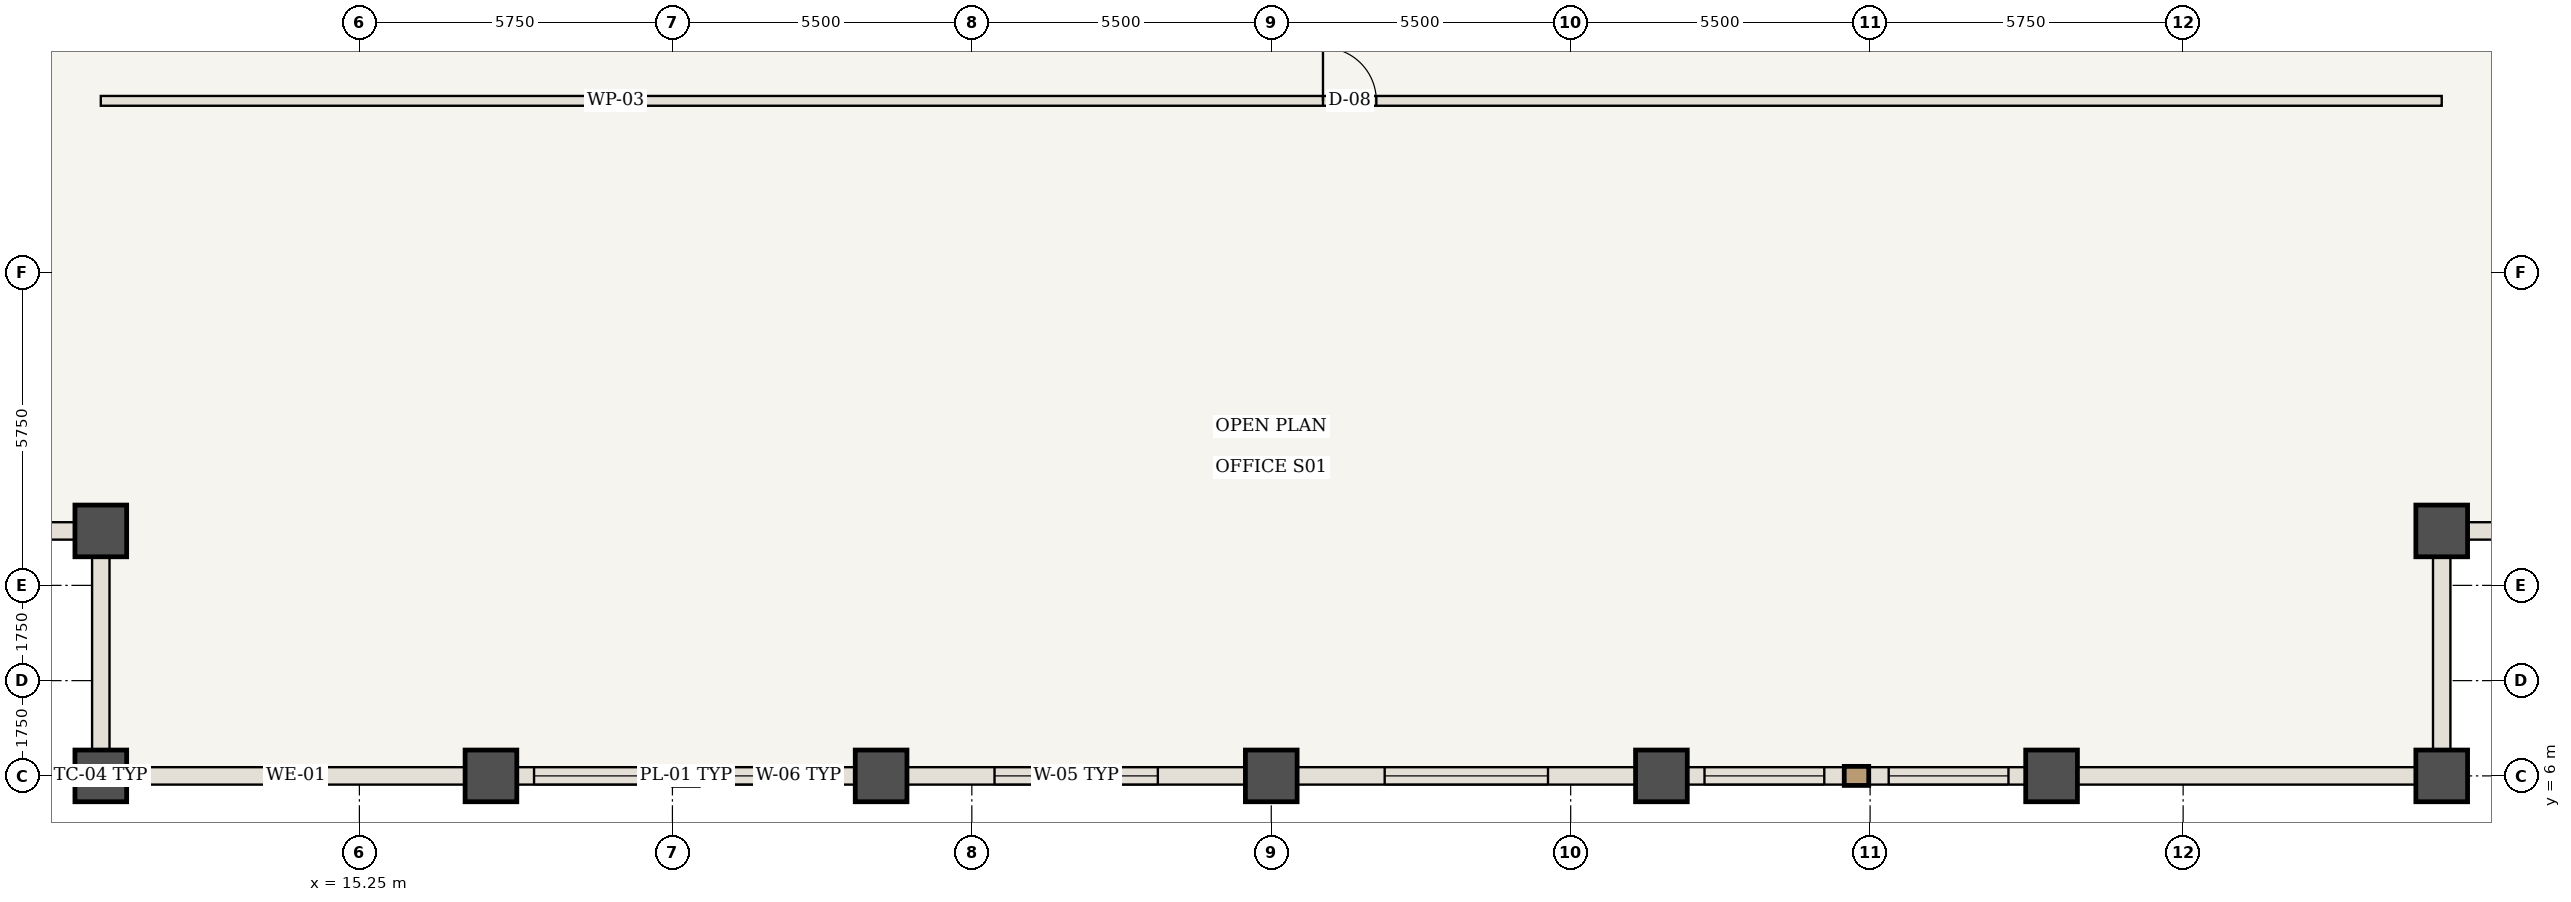
"""IFC4 building model, lengths in metres.
Left out: names, types, materials, properties, quantities, classifications, styles, units other than length and angle.
Written with IfcOpenShell. Run it as: python <this file> out.ifc"""

import sys

from ifc_helpers import new_model, si_unit, direction, frame, frame_2d, origin, origin_2d, place, context, subcontext, project, spatial, rectangle, extrude, element, fill, save


model = new_model("IFC4")
c1 = context("Model", 3, precision=1e-05, world=origin(), true_north=direction((0.0, 1.0)))
c2 = subcontext(c1, "Body", "Model", "MODEL_VIEW")
j1 = project(units=[si_unit("LENGTHUNIT", "METRE"), si_unit("PLANEANGLEUNIT", "RADIAN")], contexts=[c1])
p1 = place(None, origin())
s1 = spatial("IfcSite", under=j1, at=p1, CompositionType="ELEMENT")
p2 = place(p1, origin())
s2 = spatial("IfcBuilding", under=s1, at=p2, CompositionType="ELEMENT")
p3 = place(p2, frame((0.0, 0.0, 110.6)))
s3 = spatial("IfcBuildingStorey", under=s2, at=p3, CompositionType="ELEMENT", Elevation=110.6)
for number, where, z_axis, x_axis in (
    (1, (10.5, 6.0, 0.0), (0.0, 0.0, 1.0), (1.0, 0.0, 0.0)),
    (2, (10.5, 10.5, 0.0), (0.0, 0.0, 1.0), (1.0, 0.0, 0.0)),
    (3, (53.5, 6.0, 0.0), (0.0, 0.0, 1.0), (1.0, 0.0, 0.0)),
    (4, (53.5, 10.5, 0.0), (0.0, 0.0, 1.0), (1.0, 0.0, 0.0)),
    (5, (17.667, 6.0, 0.0), (0.0, 0.0, 1.0), (1.0, 0.0, 0.0)),
    (6, (24.833, 6.0, 0.0), (0.0, 0.0, 1.0), (1.0, 0.0, 0.0)),
    (7, (32.0, 6.0, 0.0), (0.0, 0.0, 1.0), (1.0, 0.0, 0.0)),
    (8, (39.167, 6.0, 0.0), (0.0, 0.0, 1.0), (1.0, 0.0, 0.0)),
    (9, (46.333, 6.0, 0.0), (0.0, 0.0, 1.0), (1.0, 0.0, 0.0)),
):
    element("IfcColumn", number, at=place(p3, frame(where, z_axis=z_axis, x_axis=x_axis)), inside=s3, PredefinedType="COLUMN", context=c2, shape_type="SweptSolid", body=[
        extrude(rectangle(XDim=0.95, YDim=0.95, at=origin_2d()), origin(), (0.0, 0.0, 1.0), 3.85),
    ])
p4 = place(p3, frame((10.5, 18.4, 0.0), z_axis=(0.0, 0.0, 1.0), x_axis=(1.0, 0.0, 0.0)))
e10 = element("IfcWall", 10, at=p4, inside=s3, PredefinedType="STANDARD", context=c2, shape_type="SweptSolid", body=[
    extrude(rectangle(XDim=43.0, YDim=0.18, at=frame_2d((21.5, 0.0))), origin(), (0.0, 0.0, 1.0), 3.43),
])
p5 = place(p4, frame((22.45, 0.0, 0.0)))
e11 = element("IfcOpeningElement", 11, at=p5, cuts=e10, PredefinedType="OPENING", context=c2, shape_type="SweptSolid", body=[
    extrude(rectangle(XDim=0.98, YDim=2.2, at=frame_2d((0.49, 1.1))), frame((0.0, 0.1, 0.0), z_axis=(0.0, -1.0, 0.0), x_axis=(1.0, 0.0, 0.0)), (0.0, 0.0, 1.0), 0.2),
])
p6 = place(p3, frame((17.667, 6.0, 0.0), z_axis=(0.0, 0.0, 1.0), x_axis=(-1.0, 0.0, 0.0)))
e12 = element("IfcWall", 12, at=p6, inside=s3, PredefinedType="USERDEFINED", context=c2, shape_type="SweptSolid", body=[
    extrude(rectangle(XDim=7.167, YDim=0.32, at=frame_2d((3.583, 0.0))), origin(), (0.0, 0.0, 1.0), 2.63),
])
p7 = place(p3, frame((24.833, 6.0, 0.0), z_axis=(0.0, 0.0, 1.0), x_axis=(-1.0, 0.0, 0.0)))
e13 = element("IfcWall", 13, at=p7, inside=s3, PredefinedType="USERDEFINED", context=c2, shape_type="SweptSolid", body=[
    extrude(rectangle(XDim=7.167, YDim=0.32, at=frame_2d((3.583, 0.0))), origin(), (0.0, 0.0, 1.0), 2.63),
])
p8 = place(p7, frame((0.792, 0.0, 0.85)))
e14 = element("IfcOpeningElement", 14, at=p8, cuts=e13, PredefinedType="OPENING", context=c2, shape_type="SweptSolid", body=[
    extrude(rectangle(XDim=2.2, YDim=1.58, at=frame_2d((1.1, 0.79))), frame((0.0, 0.17, 0.0), z_axis=(0.0, -1.0, 0.0), x_axis=(1.0, 0.0, 0.0)), (0.0, 0.0, 1.0), 0.34),
])
p9 = place(p7, frame((4.175, 0.0, 0.85)))
e15 = element("IfcOpeningElement", 15, at=p9, cuts=e13, PredefinedType="OPENING", context=c2, shape_type="SweptSolid", body=[
    extrude(rectangle(XDim=2.2, YDim=1.58, at=frame_2d((1.1, 0.79))), frame((0.0, 0.17, 0.0), z_axis=(0.0, -1.0, 0.0), x_axis=(1.0, 0.0, 0.0)), (0.0, 0.0, 1.0), 0.34),
])
p10 = place(p3, frame((32.0, 6.0, 0.0), z_axis=(0.0, 0.0, 1.0), x_axis=(-1.0, 0.0, 0.0)))
e16 = element("IfcWall", 16, at=p10, inside=s3, PredefinedType="USERDEFINED", context=c2, shape_type="SweptSolid", body=[
    extrude(rectangle(XDim=7.167, YDim=0.32, at=frame_2d((3.583, 0.0))), origin(), (0.0, 0.0, 1.0), 2.63),
])
p11 = place(p10, frame((2.083, 0.0, 0.85)))
e17 = element("IfcOpeningElement", 17, at=p11, cuts=e16, PredefinedType="OPENING", context=c2, shape_type="SweptSolid", body=[
    extrude(rectangle(XDim=3.0, YDim=1.58, at=frame_2d((1.5, 0.79))), frame((0.0, 0.17, 0.0), z_axis=(0.0, -1.0, 0.0), x_axis=(1.0, 0.0, 0.0)), (0.0, 0.0, 1.0), 0.34),
])
p12 = place(p3, frame((39.167, 6.0, 0.0), z_axis=(0.0, 0.0, 1.0), x_axis=(-1.0, 0.0, 0.0)))
e18 = element("IfcWall", 18, at=p12, inside=s3, PredefinedType="USERDEFINED", context=c2, shape_type="SweptSolid", body=[
    extrude(rectangle(XDim=7.167, YDim=0.32, at=frame_2d((3.583, 0.0))), origin(), (0.0, 0.0, 1.0), 2.63),
])
p13 = place(p12, frame((2.083, 0.0, 0.85)))
e19 = element("IfcOpeningElement", 19, at=p13, cuts=e18, PredefinedType="OPENING", context=c2, shape_type="SweptSolid", body=[
    extrude(rectangle(XDim=3.0, YDim=1.58, at=frame_2d((1.5, 0.79))), frame((0.0, 0.17, 0.0), z_axis=(0.0, -1.0, 0.0), x_axis=(1.0, 0.0, 0.0)), (0.0, 0.0, 1.0), 0.34),
])
p14 = place(p3, frame((46.333, 6.0, 0.0), z_axis=(0.0, 0.0, 1.0), x_axis=(-1.0, 0.0, 0.0)))
e20 = element("IfcWall", 20, at=p14, inside=s3, PredefinedType="USERDEFINED", context=c2, shape_type="SweptSolid", body=[
    extrude(rectangle(XDim=7.167, YDim=0.32, at=frame_2d((3.583, 0.0))), origin(), (0.0, 0.0, 1.0), 2.63),
])
p15 = place(p14, frame((0.792, 0.0, 0.85)))
e21 = element("IfcOpeningElement", 21, at=p15, cuts=e20, PredefinedType="OPENING", context=c2, shape_type="SweptSolid", body=[
    extrude(rectangle(XDim=2.2, YDim=1.58, at=frame_2d((1.1, 0.79))), frame((0.0, 0.17, 0.0), z_axis=(0.0, -1.0, 0.0), x_axis=(1.0, 0.0, 0.0)), (0.0, 0.0, 1.0), 0.34),
])
p16 = place(p14, frame((4.175, 0.0, 0.85)))
e22 = element("IfcOpeningElement", 22, at=p16, cuts=e20, PredefinedType="OPENING", context=c2, shape_type="SweptSolid", body=[
    extrude(rectangle(XDim=2.2, YDim=1.58, at=frame_2d((1.1, 0.79))), frame((0.0, 0.17, 0.0), z_axis=(0.0, -1.0, 0.0), x_axis=(1.0, 0.0, 0.0)), (0.0, 0.0, 1.0), 0.34),
])
p17 = place(p3, frame((53.5, 6.0, 0.0), z_axis=(0.0, 0.0, 1.0), x_axis=(-1.0, 0.0, 0.0)))
e23 = element("IfcWall", 23, at=p17, inside=s3, PredefinedType="USERDEFINED", context=c2, shape_type="SweptSolid", body=[
    extrude(rectangle(XDim=7.167, YDim=0.32, at=frame_2d((3.583, 0.0))), origin(), (0.0, 0.0, 1.0), 2.63),
])
for number, where, z_axis, x_axis in (
    (24, (10.5, 6.0, 0.0), (0.0, 0.0, 1.0), (0.0, 1.0, 0.0)),
    (25, (10.5, 10.5, 0.0), (0.0, 0.0, 1.0), (-1.0, 0.0, 0.0)),
    (26, (53.5, 10.5, 0.0), (0.0, 0.0, 1.0), (0.0, -1.0, 0.0)),
    (27, (58.0, 10.5, 0.0), (0.0, 0.0, 1.0), (-1.0, 0.0, 0.0)),
):
    element("IfcWall", number, at=place(p3, frame(where, z_axis=z_axis, x_axis=x_axis)), inside=s3, PredefinedType="USERDEFINED", context=c2, shape_type="SweptSolid", body=[
        extrude(rectangle(XDim=4.5, YDim=0.32, at=frame_2d((2.25, 0.0))), origin(), (0.0, 0.0, 1.0), 2.63),
    ])
p18 = place(p5, origin())
e28 = element("IfcDoor", 28, at=p18, inside=s3, OperationType="SINGLE_SWING_LEFT", PredefinedType="DOOR", context=c2, shape_type="SweptSolid", body=[
    extrude(rectangle(XDim=0.98, YDim=2.2, at=frame_2d((0.49, 1.1))), frame((0.0, 0.025, 0.0), z_axis=(0.0, -1.0, 0.0), x_axis=(1.0, 0.0, 0.0)), (0.0, 0.0, 1.0), 0.05),
])
fill(e11, e28)
p19 = place(p8, origin())
e29 = element("IfcWindow", 29, at=p19, inside=s3, PartitioningType="SINGLE_PANEL", PredefinedType="WINDOW", context=c2, shape_type="SweptSolid", body=[
    extrude(rectangle(XDim=2.2, YDim=1.58, at=frame_2d((1.1, 0.79))), frame((0.0, 0.03, 0.0), z_axis=(0.0, -1.0, 0.0), x_axis=(1.0, 0.0, 0.0)), (0.0, 0.0, 1.0), 0.06),
])
fill(e14, e29)
p20 = place(p9, origin())
e30 = element("IfcWindow", 30, at=p20, inside=s3, PartitioningType="SINGLE_PANEL", PredefinedType="WINDOW", context=c2, shape_type="SweptSolid", body=[
    extrude(rectangle(XDim=2.2, YDim=1.58, at=frame_2d((1.1, 0.79))), frame((0.0, 0.03, 0.0), z_axis=(0.0, -1.0, 0.0), x_axis=(1.0, 0.0, 0.0)), (0.0, 0.0, 1.0), 0.06),
])
fill(e15, e30)
p21 = place(p11, origin())
e31 = element("IfcWindow", 31, at=p21, inside=s3, PartitioningType="SINGLE_PANEL", PredefinedType="WINDOW", context=c2, shape_type="SweptSolid", body=[
    extrude(rectangle(XDim=3.0, YDim=1.58, at=frame_2d((1.5, 0.79))), frame((0.0, 0.03, 0.0), z_axis=(0.0, -1.0, 0.0), x_axis=(1.0, 0.0, 0.0)), (0.0, 0.0, 1.0), 0.06),
])
fill(e17, e31)
p22 = place(p13, origin())
e32 = element("IfcWindow", 32, at=p22, inside=s3, PartitioningType="SINGLE_PANEL", PredefinedType="WINDOW", context=c2, shape_type="SweptSolid", body=[
    extrude(rectangle(XDim=3.0, YDim=1.58, at=frame_2d((1.5, 0.79))), frame((0.0, 0.03, 0.0), z_axis=(0.0, -1.0, 0.0), x_axis=(1.0, 0.0, 0.0)), (0.0, 0.0, 1.0), 0.06),
])
fill(e19, e32)
p23 = place(p15, origin())
e33 = element("IfcWindow", 33, at=p23, inside=s3, PartitioningType="SINGLE_PANEL", PredefinedType="WINDOW", context=c2, shape_type="SweptSolid", body=[
    extrude(rectangle(XDim=2.2, YDim=1.58, at=frame_2d((1.1, 0.79))), frame((0.0, 0.03, 0.0), z_axis=(0.0, -1.0, 0.0), x_axis=(1.0, 0.0, 0.0)), (0.0, 0.0, 1.0), 0.06),
])
fill(e21, e33)
p24 = place(p16, origin())
e34 = element("IfcWindow", 34, at=p24, inside=s3, PartitioningType="SINGLE_PANEL", PredefinedType="WINDOW", context=c2, shape_type="SweptSolid", body=[
    extrude(rectangle(XDim=2.2, YDim=1.58, at=frame_2d((1.1, 0.79))), frame((0.0, 0.03, 0.0), z_axis=(0.0, -1.0, 0.0), x_axis=(1.0, 0.0, 0.0)), (0.0, 0.0, 1.0), 0.06),
])
fill(e22, e34)
save(model, sys.argv[1])
